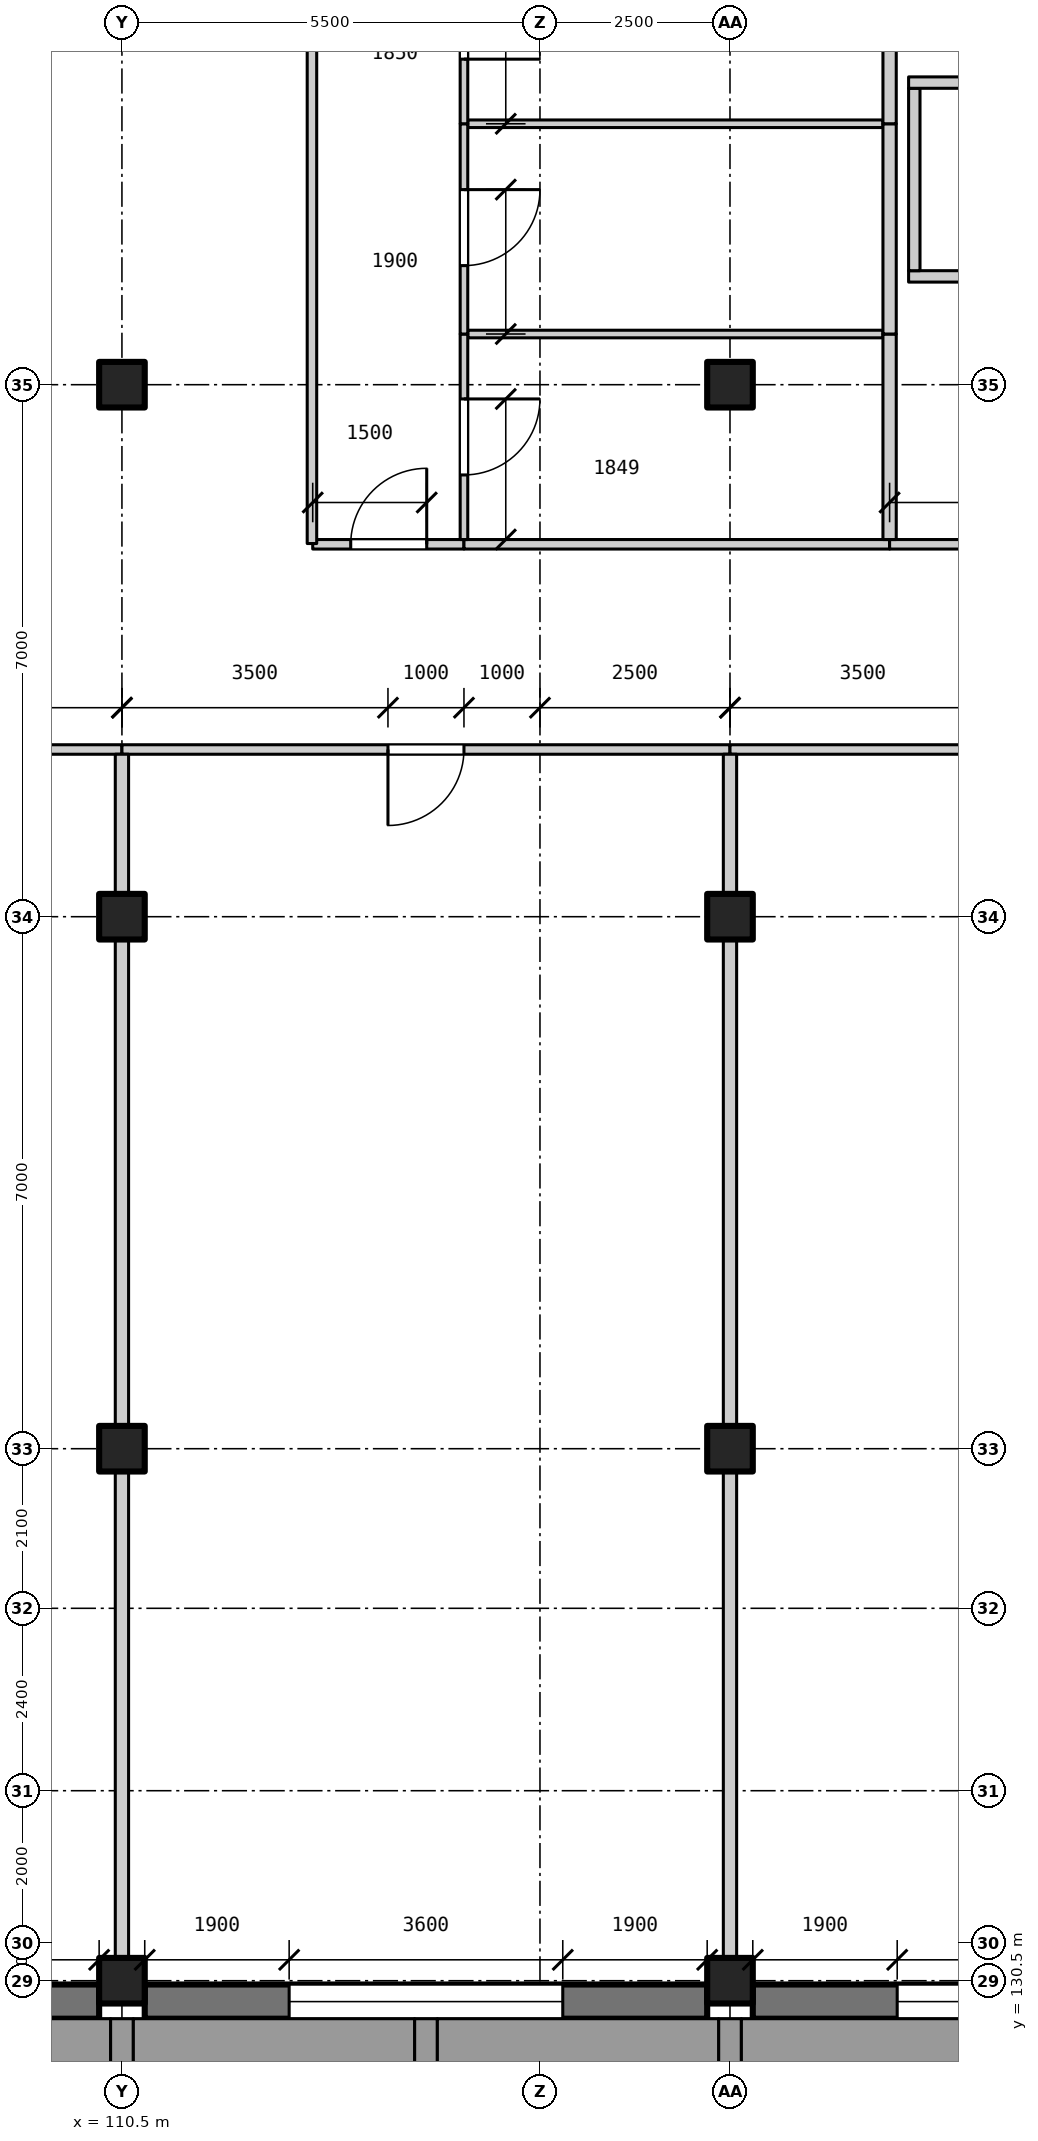
"""IFC4 building model, lengths in metres.
Left out: names, types, materials, properties, quantities, classifications, styles, units other than length and angle.
Written with IfcOpenShell. Run it as: python <this file> out.ifc"""

import sys

from ifc_helpers import new_model, si_unit, direction, frame, frame_2d, origin, origin_2d, place, context, subcontext, project, spatial, rectangle, extrude, element, fill, save


model = new_model("IFC4")
c1 = context("Model", 3, precision=1e-05, world=origin(), true_north=direction((0.0, 1.0)))
c2 = subcontext(c1, "Body", "Model", "MODEL_VIEW")
j1 = project(units=[si_unit("LENGTHUNIT", "METRE"), si_unit("PLANEANGLEUNIT", "RADIAN")], contexts=[c1])
p1 = place(None, origin())
s1 = spatial("IfcSite", under=j1, at=p1, CompositionType="ELEMENT")
p2 = place(p1, origin())
s2 = spatial("IfcBuilding", under=s1, at=p2, CompositionType="ELEMENT")
p3 = place(p2, frame((0.0, 0.0, 14.4)))
s3 = spatial("IfcBuildingStorey", under=s2, at=p3, CompositionType="ELEMENT", Elevation=14.4)
for number, where, z_axis, x_axis in (
    (1, (110.5, 130.5, 0.0), (0.0, 0.0, 1.0), (1.0, 0.0, 0.0)),
    (2, (110.5, 137.5, 0.0), (0.0, 0.0, 1.0), (1.0, 0.0, 0.0)),
    (3, (110.5, 144.5, 0.0), (0.0, 0.0, 1.0), (1.0, 0.0, 0.0)),
    (4, (110.5, 151.5, 0.0), (0.0, 0.0, 1.0), (1.0, 0.0, 0.0)),
    (5, (118.5, 130.5, 0.0), (0.0, 0.0, 1.0), (1.0, 0.0, 0.0)),
    (6, (118.5, 137.5, 0.0), (0.0, 0.0, 1.0), (1.0, 0.0, 0.0)),
    (7, (118.5, 144.5, 0.0), (0.0, 0.0, 1.0), (1.0, 0.0, 0.0)),
    (8, (118.5, 151.5, 0.0), (0.0, 0.0, 1.0), (1.0, 0.0, 0.0)),
):
    element("IfcColumn", number, at=place(p3, frame(where, z_axis=z_axis, x_axis=x_axis)), inside=s3, PredefinedType="COLUMN", context=c2, shape_type="SweptSolid", body=[
        extrude(rectangle(XDim=0.6, YDim=0.6, at=origin_2d()), origin(), (0.0, 0.0, 1.0), 3.9),
    ])
p4 = place(p3, frame((134.0, 130.125, 4.2), z_axis=(0.0, 0.0, 1.0), x_axis=(-1.0, 0.0, 0.0)))
e9 = element("IfcWall", 9, at=p4, inside=s3, PredefinedType="PARAPET", context=c2, shape_type="SweptSolid", body=[
    extrude(rectangle(XDim=48.0, YDim=0.25, at=frame_2d((24.0, 0.0))), origin(), (0.0, 0.0, 1.0), 1.1),
])
p5 = place(p3, frame((110.2, 130.225, 0.0), z_axis=(0.0, 0.0, 1.0), x_axis=(-1.0, 0.0, 0.0)))
e10 = element("IfcWall", 10, at=p5, inside=s3, PredefinedType="SOLIDWALL", context=c2, shape_type="SweptSolid", body=[
    extrude(rectangle(XDim=7.4, YDim=0.45, at=frame_2d((3.7, 0.0))), origin(), (0.0, 0.0, 1.0), 3.0),
])
p6 = place(p5, frame((1.9, 0.0, 0.9)))
e11 = element("IfcOpeningElement", 11, at=p6, cuts=e10, PredefinedType="OPENING", context=c2, shape_type="SweptSolid", body=[
    extrude(rectangle(XDim=3.6, YDim=1.6, at=frame_2d((1.8, 0.8))), frame((0.0, 0.235, 0.0), z_axis=(0.0, -1.0, 0.0), x_axis=(1.0, 0.0, 0.0)), (0.0, 0.0, 1.0), 0.47),
])
p7 = place(p3, frame((118.2, 130.225, 0.0), z_axis=(0.0, 0.0, 1.0), x_axis=(-1.0, 0.0, 0.0)))
e12 = element("IfcWall", 12, at=p7, inside=s3, PredefinedType="SOLIDWALL", context=c2, shape_type="SweptSolid", body=[
    extrude(rectangle(XDim=7.4, YDim=0.45, at=frame_2d((3.7, 0.0))), origin(), (0.0, 0.0, 1.0), 3.0),
])
p8 = place(p7, frame((1.9, 0.0, 0.9)))
e13 = element("IfcOpeningElement", 13, at=p8, cuts=e12, PredefinedType="OPENING", context=c2, shape_type="SweptSolid", body=[
    extrude(rectangle(XDim=3.6, YDim=1.6, at=frame_2d((1.8, 0.8))), frame((0.0, 0.235, 0.0), z_axis=(0.0, -1.0, 0.0), x_axis=(1.0, 0.0, 0.0)), (0.0, 0.0, 1.0), 0.47),
])
p9 = place(p3, frame((126.2, 130.225, 0.0), z_axis=(0.0, 0.0, 1.0), x_axis=(-1.0, 0.0, 0.0)))
e14 = element("IfcWall", 14, at=p9, inside=s3, PredefinedType="SOLIDWALL", context=c2, shape_type="SweptSolid", body=[
    extrude(rectangle(XDim=7.4, YDim=0.45, at=frame_2d((3.7, 0.0))), origin(), (0.0, 0.0, 1.0), 3.0),
])
p10 = place(p9, frame((1.9, 0.0, 0.9)))
e15 = element("IfcOpeningElement", 15, at=p10, cuts=e14, PredefinedType="OPENING", context=c2, shape_type="SweptSolid", body=[
    extrude(rectangle(XDim=3.6, YDim=1.6, at=frame_2d((1.8, 0.8))), frame((0.0, 0.235, 0.0), z_axis=(0.0, -1.0, 0.0), x_axis=(1.0, 0.0, 0.0)), (0.0, 0.0, 1.0), 0.47),
])
p11 = place(p3, frame((120.85, 152.925, 0.0), z_axis=(0.0, 0.0, 1.0), x_axis=(1.0, 0.0, 0.0)))
e16 = element("IfcWall", 16, at=p11, inside=s3, PredefinedType="PARTITIONING", context=c2, shape_type="SweptSolid", body=[
    extrude(rectangle(XDim=1.5, YDim=0.15, at=frame_2d((0.75, 0.0))), origin(), (0.0, 0.0, 1.0), 3.9),
])
p12 = place(p3, frame((120.925, 153.0, 0.0), z_axis=(0.0, 0.0, 1.0), x_axis=(0.0, 1.0, 0.0)))
e17 = element("IfcWall", 17, at=p12, inside=s3, PredefinedType="PARTITIONING", context=c2, shape_type="SweptSolid", body=[
    extrude(rectangle(XDim=2.4, YDim=0.15, at=frame_2d((1.2, 0.0))), origin(), (0.0, 0.0, 1.0), 3.9),
])
p13 = place(p3, frame((120.85, 155.475, 0.0), z_axis=(0.0, 0.0, 1.0), x_axis=(1.0, 0.0, 0.0)))
e18 = element("IfcWall", 18, at=p13, inside=s3, PredefinedType="PARTITIONING", context=c2, shape_type="SweptSolid", body=[
    extrude(rectangle(XDim=1.5, YDim=0.15, at=frame_2d((0.75, 0.0))), origin(), (0.0, 0.0, 1.0), 3.9),
])
p14 = place(p3, frame((102.5, 146.7, 0.0), z_axis=(0.0, 0.0, 1.0), x_axis=(1.0, 0.0, 0.0)))
e19 = element("IfcWall", 19, at=p14, inside=s3, PredefinedType="PARTITIONING", context=c2, shape_type="SweptSolid", body=[
    extrude(rectangle(XDim=8.0, YDim=0.125, at=frame_2d((4.0, 0.0))), origin(), (0.0, 0.0, 1.0), 3.9),
])
p15 = place(p14, frame((3.5, 0.0, 0.0)))
e20 = element("IfcOpeningElement", 20, at=p15, cuts=e19, PredefinedType="OPENING", context=c2, shape_type="SweptSolid", body=[
    extrude(rectangle(XDim=1.0, YDim=2.1, at=frame_2d((0.5, 1.05))), frame((0.0, 0.073, 0.0), z_axis=(0.0, -1.0, 0.0), x_axis=(1.0, 0.0, 0.0)), (0.0, 0.0, 1.0), 0.145),
])
p16 = place(p3, frame((110.5, 146.7, 0.0), z_axis=(0.0, 0.0, 1.0), x_axis=(1.0, 0.0, 0.0)))
e21 = element("IfcWall", 21, at=p16, inside=s3, PredefinedType="PARTITIONING", context=c2, shape_type="SweptSolid", body=[
    extrude(rectangle(XDim=8.0, YDim=0.125, at=frame_2d((4.0, 0.0))), origin(), (0.0, 0.0, 1.0), 3.9),
])
p17 = place(p16, frame((3.5, 0.0, 0.0)))
e22 = element("IfcOpeningElement", 22, at=p17, cuts=e21, PredefinedType="OPENING", context=c2, shape_type="SweptSolid", body=[
    extrude(rectangle(XDim=1.0, YDim=2.1, at=frame_2d((0.5, 1.05))), frame((0.0, 0.073, 0.0), z_axis=(0.0, -1.0, 0.0), x_axis=(1.0, 0.0, 0.0)), (0.0, 0.0, 1.0), 0.145),
])
p18 = place(p3, frame((118.5, 146.7, 0.0), z_axis=(0.0, 0.0, 1.0), x_axis=(1.0, 0.0, 0.0)))
e23 = element("IfcWall", 23, at=p18, inside=s3, PredefinedType="PARTITIONING", context=c2, shape_type="SweptSolid", body=[
    extrude(rectangle(XDim=8.0, YDim=0.125, at=frame_2d((4.0, 0.0))), origin(), (0.0, 0.0, 1.0), 3.9),
])
p19 = place(p18, frame((3.5, 0.0, 0.0)))
e24 = element("IfcOpeningElement", 24, at=p19, cuts=e23, PredefinedType="OPENING", context=c2, shape_type="SweptSolid", body=[
    extrude(rectangle(XDim=1.0, YDim=2.1, at=frame_2d((0.5, 1.05))), frame((0.0, 0.073, 0.0), z_axis=(0.0, -1.0, 0.0), x_axis=(1.0, 0.0, 0.0)), (0.0, 0.0, 1.0), 0.145),
])
p20 = place(p3, frame((113.01, 149.4, 0.0), z_axis=(0.0, 0.0, 1.0), x_axis=(1.0, 0.0, 0.0)))
e25 = element("IfcWall", 25, at=p20, inside=s3, PredefinedType="PARTITIONING", context=c2, shape_type="SweptSolid", body=[
    extrude(rectangle(XDim=1.99, YDim=0.125, at=frame_2d((0.995, 0.0))), origin(), (0.0, 0.0, 1.0), 3.9),
])
p21 = place(p20, frame((0.5, 0.0, 0.0)))
e26 = element("IfcOpeningElement", 26, at=p21, cuts=e25, PredefinedType="OPENING", context=c2, shape_type="SweptSolid", body=[
    extrude(rectangle(XDim=1.0, YDim=2.1, at=frame_2d((0.5, 1.05))), frame((0.0, 0.073, 0.0), z_axis=(0.0, -1.0, 0.0), x_axis=(1.0, 0.0, 0.0)), (0.0, 0.0, 1.0), 0.145),
])
p22 = place(p3, frame((115.0, 149.4, 0.0), z_axis=(0.0, 0.0, 1.0), x_axis=(1.0, 0.0, 0.0)))
e27 = element("IfcWall", 27, at=p22, inside=s3, PredefinedType="PARTITIONING", context=c2, shape_type="SweptSolid", body=[
    extrude(rectangle(XDim=5.6, YDim=0.125, at=frame_2d((2.8, 0.0))), origin(), (0.0, 0.0, 1.0), 3.9),
])
p23 = place(p3, frame((120.6, 149.4, 0.0), z_axis=(0.0, 0.0, 1.0), x_axis=(1.0, 0.0, 0.0)))
e28 = element("IfcWall", 28, at=p23, inside=s3, PredefinedType="PARTITIONING", context=c2, shape_type="SweptSolid", body=[
    extrude(rectangle(XDim=9.79, YDim=0.125, at=frame_2d((4.895, 0.0))), origin(), (0.0, 0.0, 1.0), 3.9),
])
p24 = place(p23, frame((4.4, 0.0, 0.0)))
e29 = element("IfcOpeningElement", 29, at=p24, cuts=e28, PredefinedType="OPENING", context=c2, shape_type="SweptSolid", body=[
    extrude(rectangle(XDim=1.0, YDim=2.1, at=frame_2d((0.5, 1.05))), frame((0.0, 0.073, 0.0), z_axis=(0.0, -1.0, 0.0), x_axis=(1.0, 0.0, 0.0)), (0.0, 0.0, 1.0), 0.145),
])
for number, where, z_axis, x_axis in (
    (30, (115.05, 152.167, 0.0), (0.0, 0.0, 1.0), (1.0, 0.0, 0.0)),
    (31, (115.05, 154.933, 0.0), (0.0, 0.0, 1.0), (1.0, 0.0, 0.0)),
):
    element("IfcWall", number, at=place(p3, frame(where, z_axis=z_axis, x_axis=x_axis)), inside=s3, PredefinedType="PARTITIONING", context=c2, shape_type="SweptSolid", body=[
        extrude(rectangle(XDim=5.462, YDim=0.1, at=frame_2d((2.731, 0.0))), origin(), (0.0, 0.0, 1.0), 3.9),
    ])
for number, where, z_axis, x_axis in (
    (32, (110.5, 130.8, 0.0), (0.0, 0.0, 1.0), (0.0, 1.0, 0.0)),
    (33, (110.5, 137.8, 0.0), (0.0, 0.0, 1.0), (0.0, 1.0, 0.0)),
):
    element("IfcWall", number, at=place(p3, frame(where, z_axis=z_axis, x_axis=x_axis)), inside=s3, PredefinedType="PARTITIONING", context=c2, shape_type="SweptSolid", body=[
        extrude(rectangle(XDim=6.4, YDim=0.175, at=frame_2d((3.2, 0.0))), origin(), (0.0, 0.0, 1.0), 3.1),
    ])
p25 = place(p3, frame((110.5, 144.8, 0.0), z_axis=(0.0, 0.0, 1.0), x_axis=(0.0, 1.0, 0.0)))
e34 = element("IfcWall", 34, at=p25, inside=s3, PredefinedType="PARTITIONING", context=c2, shape_type="SweptSolid", body=[
    extrude(rectangle(XDim=1.837, YDim=0.175, at=frame_2d((0.919, 0.0))), origin(), (0.0, 0.0, 1.0), 3.1),
])
p26 = place(p3, frame((113.0, 149.41, 0.0), z_axis=(0.0, 0.0, 1.0), x_axis=(0.0, 1.0, 0.0)))
e35 = element("IfcWall", 35, at=p26, inside=s3, PredefinedType="PARTITIONING", context=c2, shape_type="SweptSolid", body=[
    extrude(rectangle(XDim=8.29, YDim=0.125, at=frame_2d((4.145, 0.0))), origin(), (0.0, 0.0, 1.0), 3.9),
])
p27 = place(p3, frame((115.0, 149.462, 0.0), z_axis=(0.0, 0.0, 1.0), x_axis=(0.0, 1.0, 0.0)))
e36 = element("IfcWall", 36, at=p27, inside=s3, PredefinedType="PARTITIONING", context=c2, shape_type="SweptSolid", body=[
    extrude(rectangle(XDim=2.704, YDim=0.1, at=frame_2d((1.352, 0.0))), origin(), (0.0, 0.0, 1.0), 3.9),
])
p28 = place(p27, frame((0.85, 0.0, 0.0)))
e37 = element("IfcOpeningElement", 37, at=p28, cuts=e36, PredefinedType="OPENING", context=c2, shape_type="SweptSolid", body=[
    extrude(rectangle(XDim=1.0, YDim=2.1, at=frame_2d((0.5, 1.05))), frame((0.0, 0.06, 0.0), z_axis=(0.0, -1.0, 0.0), x_axis=(1.0, 0.0, 0.0)), (0.0, 0.0, 1.0), 0.12),
])
p29 = place(p3, frame((115.0, 152.167, 0.0), z_axis=(0.0, 0.0, 1.0), x_axis=(0.0, 1.0, 0.0)))
e38 = element("IfcWall", 38, at=p29, inside=s3, PredefinedType="PARTITIONING", context=c2, shape_type="SweptSolid", body=[
    extrude(rectangle(XDim=2.767, YDim=0.1, at=frame_2d((1.383, 0.0))), origin(), (0.0, 0.0, 1.0), 3.9),
])
p30 = place(p29, frame((0.9, 0.0, 0.0)))
e39 = element("IfcOpeningElement", 39, at=p30, cuts=e38, PredefinedType="OPENING", context=c2, shape_type="SweptSolid", body=[
    extrude(rectangle(XDim=1.0, YDim=2.1, at=frame_2d((0.5, 1.05))), frame((0.0, 0.06, 0.0), z_axis=(0.0, -1.0, 0.0), x_axis=(1.0, 0.0, 0.0)), (0.0, 0.0, 1.0), 0.12),
])
p31 = place(p3, frame((115.0, 154.933, 0.0), z_axis=(0.0, 0.0, 1.0), x_axis=(0.0, 1.0, 0.0)))
e40 = element("IfcWall", 40, at=p31, inside=s3, PredefinedType="PARTITIONING", context=c2, shape_type="SweptSolid", body=[
    extrude(rectangle(XDim=2.679, YDim=0.1, at=frame_2d((1.34, 0.0))), origin(), (0.0, 0.0, 1.0), 3.9),
])
p32 = place(p31, frame((0.85, 0.0, 0.0)))
e41 = element("IfcOpeningElement", 41, at=p32, cuts=e40, PredefinedType="OPENING", context=c2, shape_type="SweptSolid", body=[
    extrude(rectangle(XDim=1.0, YDim=2.1, at=frame_2d((0.5, 1.05))), frame((0.0, 0.06, 0.0), z_axis=(0.0, -1.0, 0.0), x_axis=(1.0, 0.0, 0.0)), (0.0, 0.0, 1.0), 0.12),
])
for number, where, z_axis, x_axis in (
    (42, (118.5, 130.8, 0.0), (0.0, 0.0, 1.0), (0.0, 1.0, 0.0)),
    (43, (118.5, 137.8, 0.0), (0.0, 0.0, 1.0), (0.0, 1.0, 0.0)),
):
    element("IfcWall", number, at=place(p3, frame(where, z_axis=z_axis, x_axis=x_axis)), inside=s3, PredefinedType="PARTITIONING", context=c2, shape_type="SweptSolid", body=[
        extrude(rectangle(XDim=6.4, YDim=0.175, at=frame_2d((3.2, 0.0))), origin(), (0.0, 0.0, 1.0), 3.1),
    ])
p33 = place(p3, frame((118.5, 144.8, 0.0), z_axis=(0.0, 0.0, 1.0), x_axis=(0.0, 1.0, 0.0)))
e44 = element("IfcWall", 44, at=p33, inside=s3, PredefinedType="PARTITIONING", context=c2, shape_type="SweptSolid", body=[
    extrude(rectangle(XDim=1.837, YDim=0.175, at=frame_2d((0.919, 0.0))), origin(), (0.0, 0.0, 1.0), 3.1),
])
p34 = place(p3, frame((120.6, 149.462, 0.0), z_axis=(0.0, 0.0, 1.0), x_axis=(0.0, 1.0, 0.0)))
e45 = element("IfcWall", 45, at=p34, inside=s3, PredefinedType="PARTITIONING", context=c2, shape_type="SweptSolid", body=[
    extrude(rectangle(XDim=2.704, YDim=0.175, at=frame_2d((1.352, 0.0))), origin(), (0.0, 0.0, 1.0), 3.9),
])
p35 = place(p3, frame((120.6, 152.167, 0.0), z_axis=(0.0, 0.0, 1.0), x_axis=(0.0, 1.0, 0.0)))
e46 = element("IfcWall", 46, at=p35, inside=s3, PredefinedType="PARTITIONING", context=c2, shape_type="SweptSolid", body=[
    extrude(rectangle(XDim=2.767, YDim=0.175, at=frame_2d((1.383, 0.0))), origin(), (0.0, 0.0, 1.0), 3.9),
])
p36 = place(p3, frame((120.6, 154.933, 0.0), z_axis=(0.0, 0.0, 1.0), x_axis=(0.0, 1.0, 0.0)))
e47 = element("IfcWall", 47, at=p36, inside=s3, PredefinedType="PARTITIONING", context=c2, shape_type="SweptSolid", body=[
    extrude(rectangle(XDim=2.679, YDim=0.175, at=frame_2d((1.34, 0.0))), origin(), (0.0, 0.0, 1.0), 3.9),
])
p37 = place(p8, origin())
e48 = element("IfcWindow", 48, at=p37, inside=s3, PartitioningType="SINGLE_PANEL", PredefinedType="WINDOW", context=c2, shape_type="SweptSolid", body=[
    extrude(rectangle(XDim=3.6, YDim=1.6, at=frame_2d((1.8, 0.8))), frame((0.0, -0.125, 0.0), z_axis=(0.0, -1.0, 0.0), x_axis=(1.0, 0.0, 0.0)), (0.0, 0.0, 1.0), 0.06),
])
fill(e13, e48)
p38 = place(p10, origin())
e49 = element("IfcWindow", 49, at=p38, inside=s3, PartitioningType="SINGLE_PANEL", PredefinedType="WINDOW", context=c2, shape_type="SweptSolid", body=[
    extrude(rectangle(XDim=3.6, YDim=1.6, at=frame_2d((1.8, 0.8))), frame((0.0, -0.125, 0.0), z_axis=(0.0, -1.0, 0.0), x_axis=(1.0, 0.0, 0.0)), (0.0, 0.0, 1.0), 0.06),
])
fill(e15, e49)
p39 = place(p17, frame((1.0, 0.0, 0.0), z_axis=(0.0, 0.0, 1.0), x_axis=(-1.0, 0.0, 0.0)))
e50 = element("IfcDoor", 50, at=p39, inside=s3, OperationType="SINGLE_SWING_RIGHT", PredefinedType="DOOR", context=c2, shape_type="SweptSolid", body=[
    extrude(rectangle(XDim=1.0, YDim=2.1, at=frame_2d((0.5, 1.05))), frame((0.0, 0.025, 0.0), z_axis=(0.0, -1.0, 0.0), x_axis=(1.0, 0.0, 0.0)), (0.0, 0.0, 1.0), 0.05),
])
fill(e22, e50)
p40 = place(p21, origin())
e51 = element("IfcDoor", 51, at=p40, inside=s3, OperationType="SINGLE_SWING_RIGHT", PredefinedType="DOOR", context=c2, shape_type="SweptSolid", body=[
    extrude(rectangle(XDim=1.0, YDim=2.1, at=frame_2d((0.5, 1.05))), frame((0.0, 0.025, 0.0), z_axis=(0.0, -1.0, 0.0), x_axis=(1.0, 0.0, 0.0)), (0.0, 0.0, 1.0), 0.05),
])
fill(e26, e51)
p41 = place(p28, frame((1.0, 0.0, 0.0), z_axis=(0.0, 0.0, 1.0), x_axis=(-1.0, 0.0, 0.0)))
e52 = element("IfcDoor", 52, at=p41, inside=s3, OperationType="SINGLE_SWING_LEFT", PredefinedType="DOOR", context=c2, shape_type="SweptSolid", body=[
    extrude(rectangle(XDim=1.0, YDim=2.1, at=frame_2d((0.5, 1.05))), frame((0.0, 0.025, 0.0), z_axis=(0.0, -1.0, 0.0), x_axis=(1.0, 0.0, 0.0)), (0.0, 0.0, 1.0), 0.05),
])
fill(e37, e52)
p42 = place(p30, frame((1.0, 0.0, 0.0), z_axis=(0.0, 0.0, 1.0), x_axis=(-1.0, 0.0, 0.0)))
e53 = element("IfcDoor", 53, at=p42, inside=s3, OperationType="SINGLE_SWING_LEFT", PredefinedType="DOOR", context=c2, shape_type="SweptSolid", body=[
    extrude(rectangle(XDim=1.0, YDim=2.1, at=frame_2d((0.5, 1.05))), frame((0.0, 0.025, 0.0), z_axis=(0.0, -1.0, 0.0), x_axis=(1.0, 0.0, 0.0)), (0.0, 0.0, 1.0), 0.05),
])
fill(e39, e53)
p43 = place(p32, frame((1.0, 0.0, 0.0), z_axis=(0.0, 0.0, 1.0), x_axis=(-1.0, 0.0, 0.0)))
e54 = element("IfcDoor", 54, at=p43, inside=s3, OperationType="SINGLE_SWING_RIGHT", PredefinedType="DOOR", context=c2, shape_type="SweptSolid", body=[
    extrude(rectangle(XDim=1.0, YDim=2.1, at=frame_2d((0.5, 1.05))), frame((0.0, 0.025, 0.0), z_axis=(0.0, -1.0, 0.0), x_axis=(1.0, 0.0, 0.0)), (0.0, 0.0, 1.0), 0.05),
])
fill(e41, e54)
save(model, sys.argv[1])
